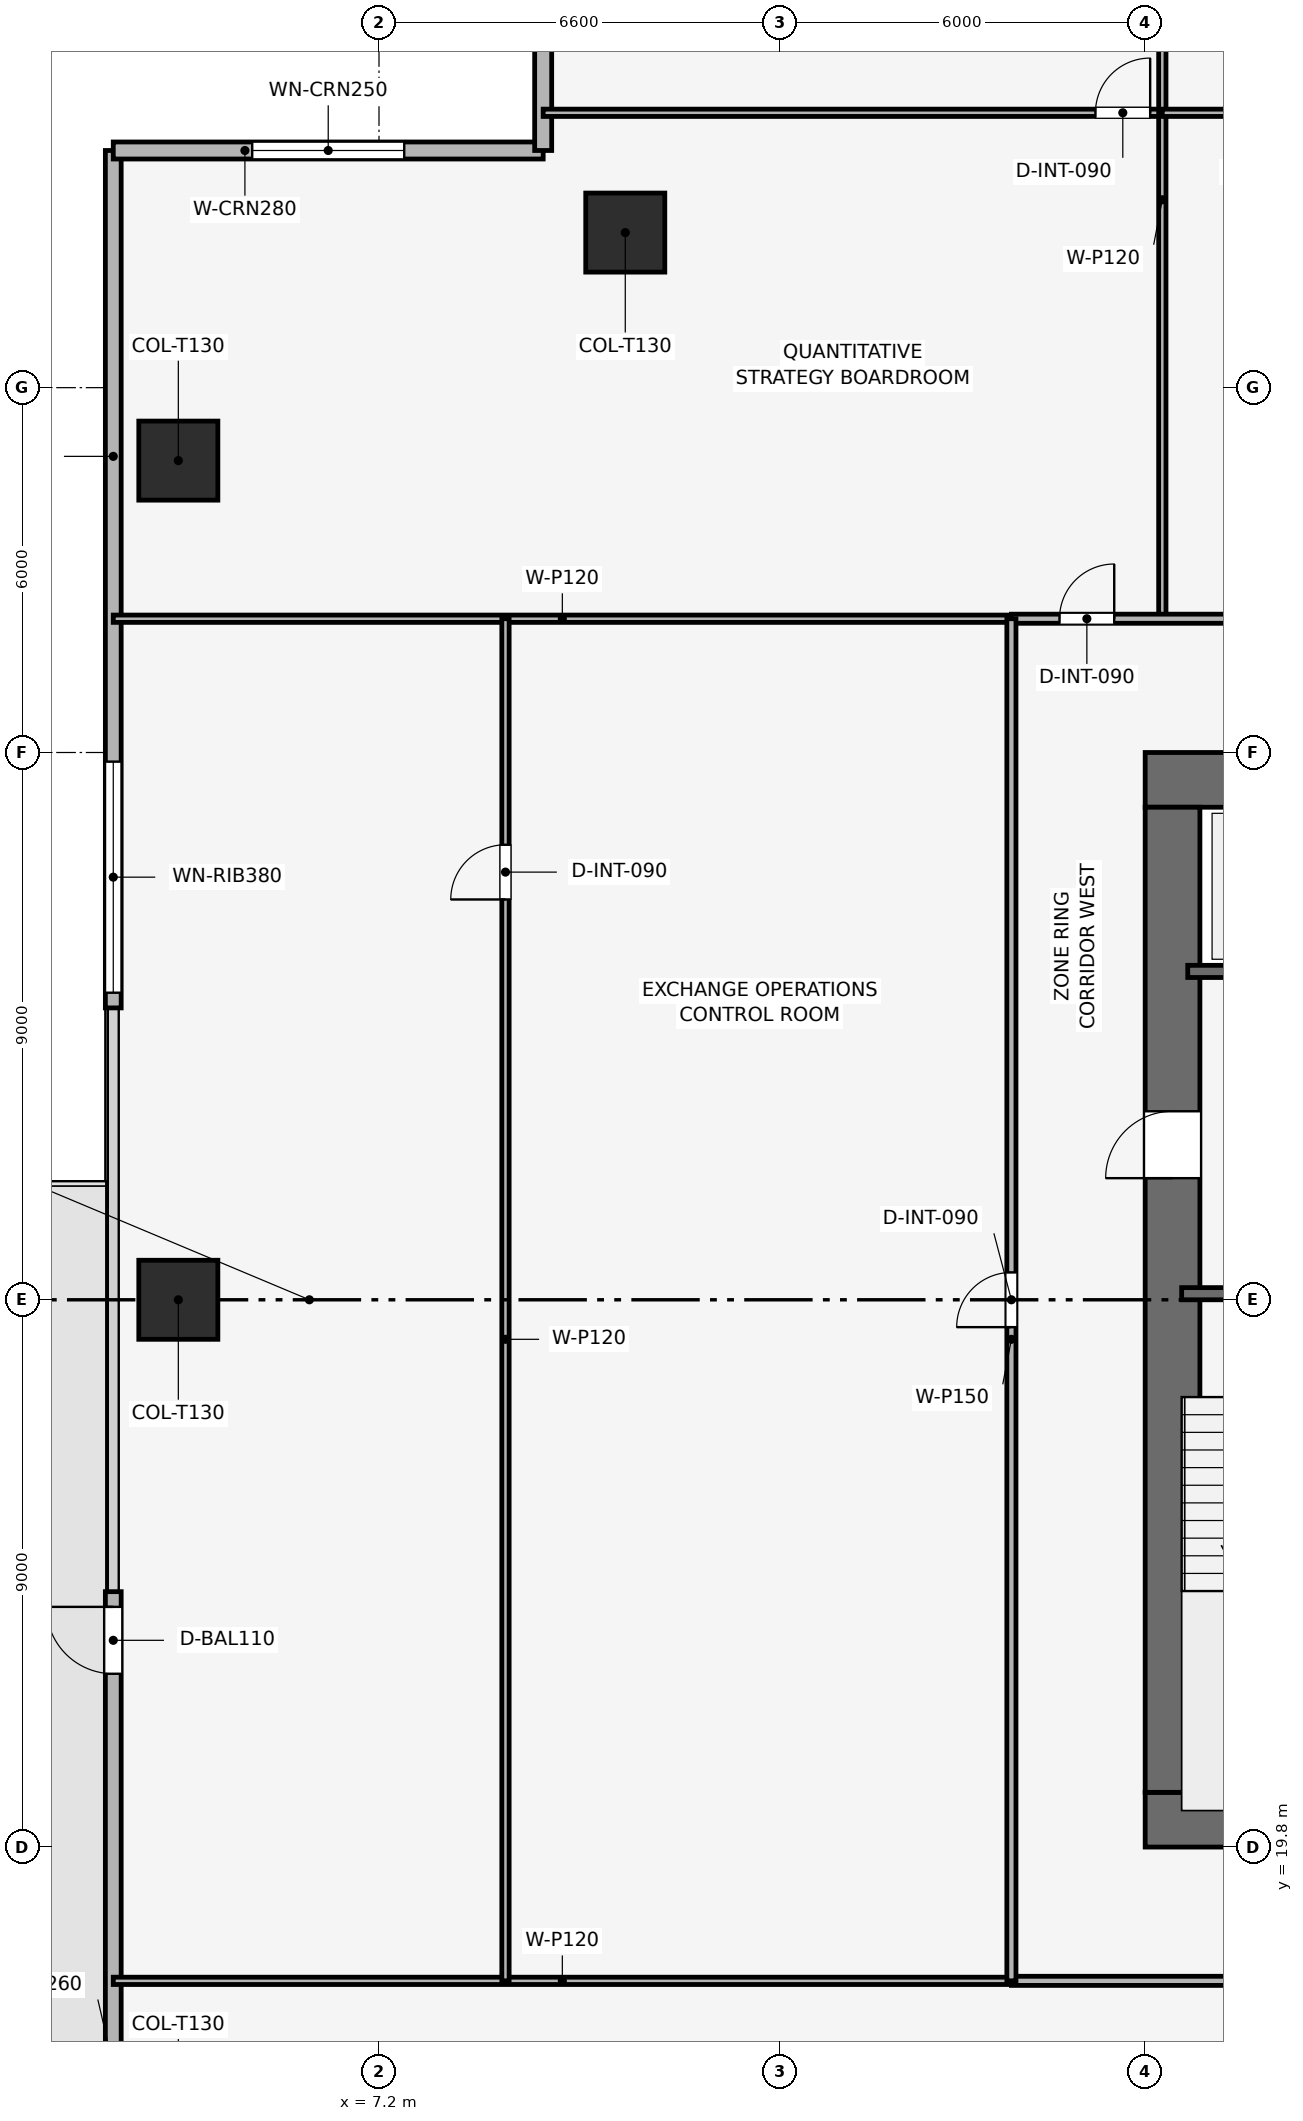
"""IFC4 building model, lengths in metres.
Left out: names, types, materials, properties, quantities, classifications, styles, units other than length and angle.
Written with IfcOpenShell. Run it as: python <this file> out.ifc"""

import sys

from ifc_helpers import new_model, si_unit, direction, frame, frame_2d, origin, origin_2d, place, context, subcontext, project, spatial, rectangle, extrude, element, fill, save


model = new_model("IFC4")
c1 = context("Model", 3, precision=1e-05, world=origin(), true_north=direction((0.0, 1.0)))
c2 = subcontext(c1, "Body", "Model", "MODEL_VIEW")
j1 = project(units=[si_unit("LENGTHUNIT", "METRE"), si_unit("PLANEANGLEUNIT", "RADIAN")], contexts=[c1])
p1 = place(None, origin())
s1 = spatial("IfcSite", under=j1, at=p1, CompositionType="ELEMENT")
p2 = place(p1, origin())
s2 = spatial("IfcBuilding", under=s1, at=p2, CompositionType="ELEMENT")
p3 = place(p2, frame((0.0, 0.0, 117.3)))
s3 = spatial("IfcBuildingStorey", under=s2, at=p3, CompositionType="ELEMENT", Elevation=117.3)
p4 = place(p3, frame((19.8, 20.25, 0.0), z_axis=(0.0, 0.0, 1.0), x_axis=(1.0, 0.0, 0.0)))
e1 = element("IfcWall", 1, at=p4, inside=s3, PredefinedType="SHEAR", context=c2, shape_type="SweptSolid", body=[
    extrude(rectangle(XDim=18.0, YDim=0.9, at=frame_2d((9.0, 0.0))), origin(), (0.0, 0.0, 1.0), 3.9),
])
p5 = place(p4, frame((8.4, 0.0, 0.0)))
e2 = element("IfcOpeningElement", 2, at=p5, cuts=e1, PredefinedType="OPENING", context=c2, shape_type="SweptSolid", body=[
    extrude(rectangle(XDim=1.2, YDim=2.2, at=frame_2d((0.6, 1.1))), frame((0.0, 0.46, 0.0), z_axis=(0.0, -1.0, 0.0), x_axis=(1.0, 0.0, 0.0)), (0.0, 0.0, 1.0), 0.92),
])
p6 = place(p3, frame((19.8, 37.35, 0.0), z_axis=(0.0, 0.0, 1.0), x_axis=(1.0, 0.0, 0.0)))
e3 = element("IfcWall", 3, at=p6, inside=s3, PredefinedType="SHEAR", context=c2, shape_type="SweptSolid", body=[
    extrude(rectangle(XDim=18.0, YDim=0.9, at=frame_2d((9.0, 0.0))), origin(), (0.0, 0.0, 1.0), 3.9),
])
p7 = place(p6, frame((7.05, 0.0, 0.0)))
e4 = element("IfcOpeningElement", 4, at=p7, cuts=e3, PredefinedType="OPENING", context=c2, shape_type="SweptSolid", body=[
    extrude(rectangle(XDim=1.1, YDim=2.15, at=frame_2d((0.55, 1.075))), frame((0.0, 0.46, 0.0), z_axis=(0.0, -1.0, 0.0), x_axis=(1.0, 0.0, 0.0)), (0.0, 0.0, 1.0), 0.92),
])
p8 = place(p3, frame((20.25, 20.7, 0.0), z_axis=(0.0, 0.0, 1.0), x_axis=(0.0, 1.0, 0.0)))
e5 = element("IfcWall", 5, at=p8, inside=s3, PredefinedType="SHEAR", context=c2, shape_type="SweptSolid", body=[
    extrude(rectangle(XDim=16.2, YDim=0.9, at=frame_2d((8.1, 0.0))), origin(), (0.0, 0.0, 1.0), 3.9),
])
p9 = place(p8, frame((10.1, 0.0, 0.0)))
e6 = element("IfcOpeningElement", 6, at=p9, cuts=e5, PredefinedType="OPENING", context=c2, shape_type="SweptSolid", body=[
    extrude(rectangle(XDim=1.1, YDim=2.15, at=frame_2d((0.55, 1.075))), frame((0.0, 0.46, 0.0), z_axis=(0.0, -1.0, 0.0), x_axis=(1.0, 0.0, 0.0)), (0.0, 0.0, 1.0), 0.92),
])
for number, where, z_axis, x_axis in (
    (7, (3.9, 42.6, 0.003), (0.0, 0.0, 1.0), (1.0, 0.0, 0.0)),
    (8, (3.9, 28.8, 0.003), (0.0, 0.0, 1.0), (1.0, 0.0, 0.0)),
    (9, (11.25, 46.35, 0.003), (0.0, 0.0, 1.0), (1.0, 0.0, 0.0)),
):
    element("IfcColumn", number, at=place(p3, frame(where, z_axis=z_axis, x_axis=x_axis)), inside=s3, PredefinedType="COLUMN", context=c2, shape_type="SweptSolid", body=[
        extrude(rectangle(XDim=1.3, YDim=1.3, at=origin_2d()), origin(), (0.0, 0.0, 1.0), 3.644),
    ])
p10 = place(p3, frame((2.83, 9.9, 0.0), z_axis=(0.0, 0.0, 1.0), x_axis=(0.0, 1.0, 0.0)))
e10 = element("IfcWall", 10, at=p10, inside=s3, PredefinedType="SOLIDWALL", context=c2, shape_type="SweptSolid", body=[
    extrude(rectangle(XDim=14.1, YDim=0.26, at=frame_2d((7.05, 0.0))), origin(), (0.0, 0.0, 1.0), 3.65),
])
p11 = place(p10, frame((12.75, 0.0, 0.0)))
e11 = element("IfcOpeningElement", 11, at=p11, cuts=e10, PredefinedType="OPENING", context=c2, shape_type="SweptSolid", body=[
    extrude(rectangle(XDim=1.1, YDim=2.2, at=frame_2d((0.55, 1.1))), frame((0.0, 0.14, 0.0), z_axis=(0.0, -1.0, 0.0), x_axis=(1.0, 0.0, 0.0)), (0.0, 0.0, 1.0), 0.28),
])
p12 = place(p3, frame((2.83, 33.6, 0.0), z_axis=(0.0, 0.0, 1.0), x_axis=(0.0, 1.0, 0.0)))
e12 = element("IfcWall", 12, at=p12, inside=s3, PredefinedType="SOLIDWALL", context=c2, shape_type="SweptSolid", body=[
    extrude(rectangle(XDim=14.1, YDim=0.26, at=frame_2d((7.05, 0.0))), origin(), (0.0, 0.0, 1.0), 3.65),
])
p13 = place(p12, frame((0.25, 0.0, 0.9)))
e13 = element("IfcOpeningElement", 13, at=p13, cuts=e12, PredefinedType="OPENING", context=c2, shape_type="SweptSolid", body=[
    extrude(rectangle(XDim=3.8, YDim=1.9, at=frame_2d((1.9, 0.95))), frame((0.0, 0.14, 0.0), z_axis=(0.0, -1.0, 0.0), x_axis=(1.0, 0.0, 0.0)), (0.0, 0.0, 1.0), 0.28),
])
p14 = place(p3, frame((2.83, 47.7, 0.0), z_axis=(0.0, 0.0, 1.0), x_axis=(1.0, 0.0, 0.0)))
e14 = element("IfcWall", 14, at=p14, inside=s3, PredefinedType="SOLIDWALL", context=c2, shape_type="SweptSolid", body=[
    extrude(rectangle(XDim=7.07, YDim=0.28, at=frame_2d((3.535, 0.0))), origin(), (0.0, 0.0, 1.0), 3.65),
])
p15 = place(p14, frame((2.285, 0.0, 0.9)))
e15 = element("IfcOpeningElement", 15, at=p15, cuts=e14, PredefinedType="OPENING", context=c2, shape_type="SweptSolid", body=[
    extrude(rectangle(XDim=2.5, YDim=1.9, at=frame_2d((1.25, 0.95))), frame((0.0, 0.15, 0.0), z_axis=(0.0, -1.0, 0.0), x_axis=(1.0, 0.0, 0.0)), (0.0, 0.0, 1.0), 0.3),
])
p16 = place(p3, frame((9.9, 47.7, 0.0), z_axis=(0.0, 0.0, 1.0), x_axis=(0.0, 1.0, 0.0)))
e16 = element("IfcWall", 16, at=p16, inside=s3, PredefinedType="SOLIDWALL", context=c2, shape_type="SweptSolid", body=[
    extrude(rectangle(XDim=7.07, YDim=0.28, at=frame_2d((3.535, 0.0))), origin(), (0.0, 0.0, 1.0), 3.65),
])
p17 = place(p16, frame((2.285, 0.0, 0.9)))
e17 = element("IfcOpeningElement", 17, at=p17, cuts=e16, PredefinedType="OPENING", context=c2, shape_type="SweptSolid", body=[
    extrude(rectangle(XDim=2.5, YDim=1.9, at=frame_2d((1.25, 0.95))), frame((0.0, 0.15, 0.0), z_axis=(0.0, -1.0, 0.0), x_axis=(1.0, 0.0, 0.0)), (0.0, 0.0, 1.0), 0.3),
])
p18 = place(p3, frame((20.4, 28.9, 0.0), z_axis=(0.0, 0.0, 1.0), x_axis=(1.0, 0.0, 0.0)))
e18 = element("IfcWall", 18, at=p18, inside=s3, PredefinedType="SHEAR", context=c2, shape_type="SweptSolid", body=[
    extrude(rectangle(XDim=3.15, YDim=0.2, at=frame_2d((1.575, 0.0))), origin(), (0.0, 0.0, 1.0), 3.65),
])
p19 = place(p18, frame((0.8, 0.0, 0.0)))
e19 = element("IfcOpeningElement", 19, at=p19, cuts=e18, PredefinedType="OPENING", context=c2, shape_type="SweptSolid", body=[
    extrude(rectangle(XDim=1.0, YDim=2.1, at=frame_2d((0.5, 1.05))), frame((0.0, 0.11, 0.0), z_axis=(0.0, -1.0, 0.0), x_axis=(1.0, 0.0, 0.0)), (0.0, 0.0, 1.0), 0.22),
])
p20 = place(p3, frame((20.5, 34.2, 0.0), z_axis=(0.0, 0.0, 1.0), x_axis=(1.0, 0.0, 0.0)))
e20 = element("IfcWall", 20, at=p20, inside=s3, PredefinedType="SHEAR", context=c2, shape_type="SweptSolid", body=[
    extrude(rectangle(XDim=3.05, YDim=0.2, at=frame_2d((1.525, 0.0))), origin(), (0.0, 0.0, 1.0), 3.65),
])
p21 = place(p20, frame((0.75, 0.0, 0.0)))
e21 = element("IfcOpeningElement", 21, at=p21, cuts=e20, PredefinedType="OPENING", context=c2, shape_type="SweptSolid", body=[
    extrude(rectangle(XDim=1.1, YDim=2.15, at=frame_2d((0.55, 1.075))), frame((0.0, 0.11, 0.0), z_axis=(0.0, -1.0, 0.0), x_axis=(1.0, 0.0, 0.0)), (0.0, 0.0, 1.0), 0.22),
])
p22 = place(p3, frame((9.9, 48.32, 0.0), z_axis=(0.0, 0.0, 1.0), x_axis=(1.0, 0.0, 0.0)))
e22 = element("IfcWall", 22, at=p22, inside=s3, PredefinedType="PARTITIONING", context=c2, shape_type="SweptSolid", body=[
    extrude(rectangle(XDim=10.182, YDim=0.12, at=frame_2d((5.091, 0.0))), origin(), (0.0, 0.0, 1.0), 3.035),
])
p23 = place(p22, frame((9.082, 0.0, 0.0)))
e23 = element("IfcOpeningElement", 23, at=p23, cuts=e22, PredefinedType="OPENING", context=c2, shape_type="SweptSolid", body=[
    extrude(rectangle(XDim=0.9, YDim=2.1, at=frame_2d((0.45, 1.05))), frame((0.0, 0.07, 0.0), z_axis=(0.0, -1.0, 0.0), x_axis=(1.0, 0.0, 0.0)), (0.0, 0.0, 1.0), 0.14),
])
p24 = place(p3, frame((20.082, 40.0, 0.0), z_axis=(0.0, 0.0, 1.0), x_axis=(0.0, 1.0, 0.0)))
e24 = element("IfcWall", 24, at=p24, inside=s3, PredefinedType="PARTITIONING", context=c2, shape_type="SweptSolid", body=[
    extrude(rectangle(XDim=14.77, YDim=0.12, at=frame_2d((7.385, 0.0))), origin(), (0.0, 0.0, 1.0), 3.035),
])
p25 = place(p3, frame((20.082, 48.32, 0.0), z_axis=(0.0, 0.0, 1.0), x_axis=(1.0, 0.0, 0.0)))
e25 = element("IfcWall", 25, at=p25, inside=s3, PredefinedType="PARTITIONING", context=c2, shape_type="SweptSolid", body=[
    extrude(rectangle(XDim=5.764, YDim=0.12, at=frame_2d((2.882, 0.0))), origin(), (0.0, 0.0, 1.0), 3.185),
])
p26 = place(p25, frame((1.316, 0.0, 0.0)))
e26 = element("IfcOpeningElement", 26, at=p26, cuts=e25, PredefinedType="OPENING", context=c2, shape_type="SweptSolid", body=[
    extrude(rectangle(XDim=0.9, YDim=2.1, at=frame_2d((0.45, 1.05))), frame((0.0, 0.07, 0.0), z_axis=(0.0, -1.0, 0.0), x_axis=(1.0, 0.0, 0.0)), (0.0, 0.0, 1.0), 0.14),
])
for number, where, z_axis, x_axis in (
    (27, (2.83, 17.6, 0.0), (0.0, 0.0, 1.0), (1.0, 0.0, 0.0)),
    (28, (2.83, 40.0, 0.0), (0.0, 0.0, 1.0), (1.0, 0.0, 0.0)),
):
    element("IfcWall", number, at=place(p3, frame(where, z_axis=z_axis, x_axis=x_axis)), inside=s3, PredefinedType="PARTITIONING", context=c2, shape_type="SweptSolid", body=[
        extrude(rectangle(XDim=14.77, YDim=0.12, at=frame_2d((7.385, 0.0))), origin(), (0.0, 0.0, 1.0), 3.035),
    ])
p27 = place(p3, frame((9.28, 17.6, 0.0), z_axis=(0.0, 0.0, 1.0), x_axis=(0.0, 1.0, 0.0)))
e29 = element("IfcWall", 29, at=p27, inside=s3, PredefinedType="PARTITIONING", context=c2, shape_type="SweptSolid", body=[
    extrude(rectangle(XDim=22.4, YDim=0.12, at=frame_2d((11.2, 0.0))), origin(), (0.0, 0.0, 1.0), 3.185),
])
p28 = place(p27, frame((17.783, 0.0, 0.0)))
e30 = element("IfcOpeningElement", 30, at=p28, cuts=e29, PredefinedType="OPENING", context=c2, shape_type="SweptSolid", body=[
    extrude(rectangle(XDim=0.9, YDim=2.1, at=frame_2d((0.45, 1.05))), frame((0.0, 0.07, 0.0), z_axis=(0.0, -1.0, 0.0), x_axis=(1.0, 0.0, 0.0)), (0.0, 0.0, 1.0), 0.14),
])
p29 = place(p3, frame((17.6, 17.6, 0.0), z_axis=(0.0, 0.0, 1.0), x_axis=(1.0, 0.0, 0.0)))
e31 = element("IfcWall", 31, at=p29, inside=s3, PredefinedType="PARTITIONING", context=c2, shape_type="SweptSolid", body=[
    extrude(rectangle(XDim=22.4, YDim=0.15, at=frame_2d((11.2, 0.0))), origin(), (0.0, 0.0, 1.0), 3.185),
])
p30 = place(p29, frame((10.75, 0.0, 0.0)))
e32 = element("IfcOpeningElement", 32, at=p30, cuts=e31, PredefinedType="OPENING", context=c2, shape_type="SweptSolid", body=[
    extrude(rectangle(XDim=0.9, YDim=2.1, at=frame_2d((0.45, 1.05))), frame((0.0, 0.085, 0.0), z_axis=(0.0, -1.0, 0.0), x_axis=(1.0, 0.0, 0.0)), (0.0, 0.0, 1.0), 0.17),
])
p31 = place(p3, frame((17.6, 40.0, 0.0), z_axis=(0.0, 0.0, 1.0), x_axis=(1.0, 0.0, 0.0)))
e33 = element("IfcWall", 33, at=p31, inside=s3, PredefinedType="PARTITIONING", context=c2, shape_type="SweptSolid", body=[
    extrude(rectangle(XDim=22.4, YDim=0.15, at=frame_2d((11.2, 0.0))), origin(), (0.0, 0.0, 1.0), 3.185),
])
p32 = place(p31, frame((0.791, 0.0, 0.0)))
e34 = element("IfcOpeningElement", 34, at=p32, cuts=e33, PredefinedType="OPENING", context=c2, shape_type="SweptSolid", body=[
    extrude(rectangle(XDim=0.9, YDim=2.1, at=frame_2d((0.45, 1.05))), frame((0.0, 0.085, 0.0), z_axis=(0.0, -1.0, 0.0), x_axis=(1.0, 0.0, 0.0)), (0.0, 0.0, 1.0), 0.17),
])
p33 = place(p31, frame((4.914, 0.0, 0.0)))
e35 = element("IfcOpeningElement", 35, at=p33, cuts=e33, PredefinedType="OPENING", context=c2, shape_type="SweptSolid", body=[
    extrude(rectangle(XDim=0.9, YDim=2.1, at=frame_2d((0.45, 1.05))), frame((0.0, 0.085, 0.0), z_axis=(0.0, -1.0, 0.0), x_axis=(1.0, 0.0, 0.0)), (0.0, 0.0, 1.0), 0.17),
])
p34 = place(p31, frame((10.678, 0.0, 0.0)))
e36 = element("IfcOpeningElement", 36, at=p34, cuts=e33, PredefinedType="OPENING", context=c2, shape_type="SweptSolid", body=[
    extrude(rectangle(XDim=0.9, YDim=2.1, at=frame_2d((0.45, 1.05))), frame((0.0, 0.085, 0.0), z_axis=(0.0, -1.0, 0.0), x_axis=(1.0, 0.0, 0.0)), (0.0, 0.0, 1.0), 0.17),
])
p35 = place(p31, frame((17.755, 0.0, 0.0)))
e37 = element("IfcOpeningElement", 37, at=p35, cuts=e33, PredefinedType="OPENING", context=c2, shape_type="SweptSolid", body=[
    extrude(rectangle(XDim=0.9, YDim=2.1, at=frame_2d((0.45, 1.05))), frame((0.0, 0.085, 0.0), z_axis=(0.0, -1.0, 0.0), x_axis=(1.0, 0.0, 0.0)), (0.0, 0.0, 1.0), 0.17),
])
p36 = place(p3, frame((17.6, 17.6, 0.0), z_axis=(0.0, 0.0, 1.0), x_axis=(0.0, 1.0, 0.0)))
e38 = element("IfcWall", 38, at=p36, inside=s3, PredefinedType="PARTITIONING", context=c2, shape_type="SweptSolid", body=[
    extrude(rectangle(XDim=22.4, YDim=0.15, at=frame_2d((11.2, 0.0))), origin(), (0.0, 0.0, 1.0), 3.185),
])
p37 = place(p36, frame((10.75, 0.0, 0.0)))
e39 = element("IfcOpeningElement", 39, at=p37, cuts=e38, PredefinedType="OPENING", context=c2, shape_type="SweptSolid", body=[
    extrude(rectangle(XDim=0.9, YDim=2.1, at=frame_2d((0.45, 1.05))), frame((0.0, 0.085, 0.0), z_axis=(0.0, -1.0, 0.0), x_axis=(1.0, 0.0, 0.0)), (0.0, 0.0, 1.0), 0.17),
])
p38 = place(p11, origin())
e40 = element("IfcDoor", 40, at=p38, inside=s3, OperationType="SINGLE_SWING_RIGHT", PredefinedType="DOOR", context=c2, shape_type="SweptSolid", body=[
    extrude(rectangle(XDim=1.1, YDim=2.2, at=frame_2d((0.55, 1.1))), frame((0.0, 0.025, 0.0), z_axis=(0.0, -1.0, 0.0), x_axis=(1.0, 0.0, 0.0)), (0.0, 0.0, 1.0), 0.05),
])
fill(e11, e40)
p39 = place(p13, origin())
e41 = element("IfcWindow", 41, at=p39, inside=s3, PartitioningType="SINGLE_PANEL", PredefinedType="WINDOW", context=c2, shape_type="SweptSolid", body=[
    extrude(rectangle(XDim=3.8, YDim=1.9, at=frame_2d((1.9, 0.95))), frame((0.0, 0.03, 0.0), z_axis=(0.0, -1.0, 0.0), x_axis=(1.0, 0.0, 0.0)), (0.0, 0.0, 1.0), 0.06),
])
fill(e13, e41)
p40 = place(p15, origin())
e42 = element("IfcWindow", 42, at=p40, inside=s3, PartitioningType="SINGLE_PANEL", PredefinedType="WINDOW", context=c2, shape_type="SweptSolid", body=[
    extrude(rectangle(XDim=2.5, YDim=1.9, at=frame_2d((1.25, 0.95))), frame((0.0, 0.03, 0.0), z_axis=(0.0, -1.0, 0.0), x_axis=(1.0, 0.0, 0.0)), (0.0, 0.0, 1.0), 0.06),
])
fill(e15, e42)
p41 = place(p23, origin())
e43 = element("IfcDoor", 43, at=p41, inside=s3, OperationType="SINGLE_SWING_RIGHT", PredefinedType="DOOR", context=c2, shape_type="SweptSolid", body=[
    extrude(rectangle(XDim=0.9, YDim=2.1, at=frame_2d((0.45, 1.05))), frame((0.0, 0.025, 0.0), z_axis=(0.0, -1.0, 0.0), x_axis=(1.0, 0.0, 0.0)), (0.0, 0.0, 1.0), 0.05),
])
fill(e23, e43)
p42 = place(p28, origin())
e44 = element("IfcDoor", 44, at=p42, inside=s3, OperationType="SINGLE_SWING_LEFT", PredefinedType="DOOR", context=c2, shape_type="SweptSolid", body=[
    extrude(rectangle(XDim=0.9, YDim=2.1, at=frame_2d((0.45, 1.05))), frame((0.0, 0.025, 0.0), z_axis=(0.0, -1.0, 0.0), x_axis=(1.0, 0.0, 0.0)), (0.0, 0.0, 1.0), 0.05),
])
fill(e30, e44)
p43 = place(p32, origin())
e45 = element("IfcDoor", 45, at=p43, inside=s3, OperationType="SINGLE_SWING_RIGHT", PredefinedType="DOOR", context=c2, shape_type="SweptSolid", body=[
    extrude(rectangle(XDim=0.9, YDim=2.1, at=frame_2d((0.45, 1.05))), frame((0.0, 0.025, 0.0), z_axis=(0.0, -1.0, 0.0), x_axis=(1.0, 0.0, 0.0)), (0.0, 0.0, 1.0), 0.05),
])
fill(e34, e45)
p44 = place(p37, origin())
e46 = element("IfcDoor", 46, at=p44, inside=s3, OperationType="SINGLE_SWING_LEFT", PredefinedType="DOOR", context=c2, shape_type="SweptSolid", body=[
    extrude(rectangle(XDim=0.9, YDim=2.1, at=frame_2d((0.45, 1.05))), frame((0.0, 0.025, 0.0), z_axis=(0.0, -1.0, 0.0), x_axis=(1.0, 0.0, 0.0)), (0.0, 0.0, 1.0), 0.05),
])
fill(e39, e46)
p45 = place(p9, origin())
e47 = element("IfcDoor", 47, at=p45, inside=s3, OperationType="SINGLE_SWING_LEFT", PredefinedType="DOOR", context=c2, shape_type="SweptSolid", body=[
    extrude(rectangle(XDim=1.1, YDim=2.15, at=frame_2d((0.55, 1.075))), frame((0.0, 0.025, 0.0), z_axis=(0.0, -1.0, 0.0), x_axis=(1.0, 0.0, 0.0)), (0.0, 0.0, 1.0), 0.05),
])
fill(e6, e47)
save(model, sys.argv[1])
